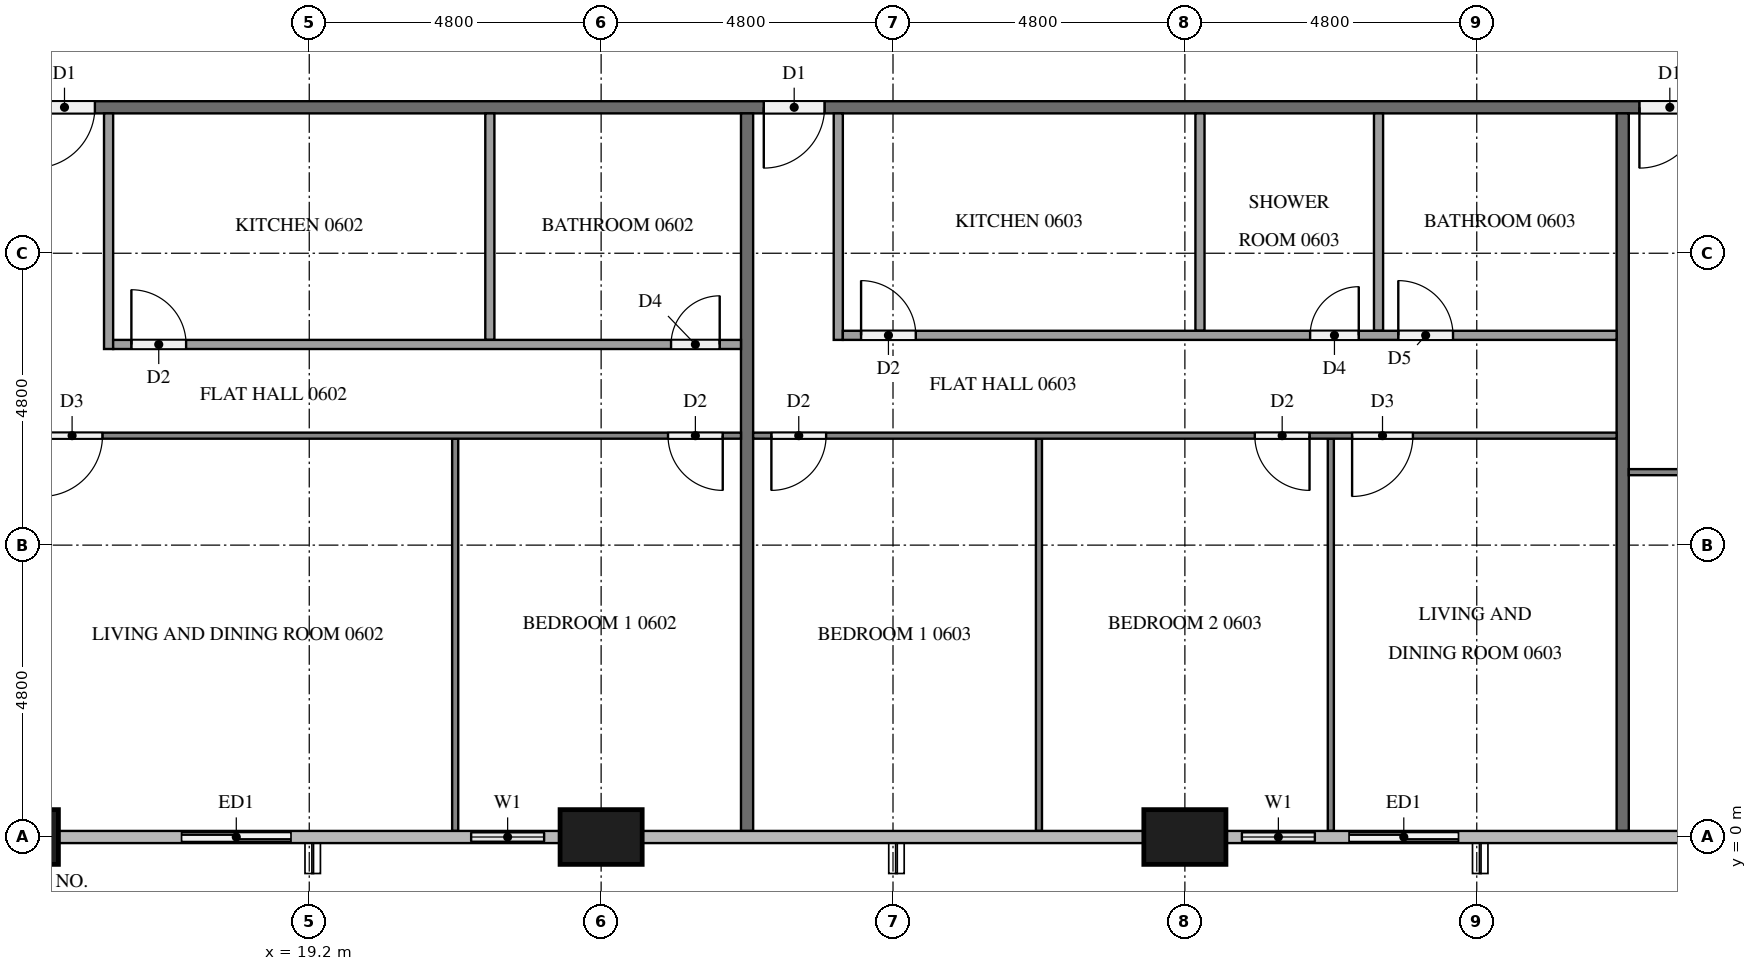
"""IFC4 building model, lengths in metres.
Left out: names, types, materials, properties, quantities, classifications, styles, units other than length and angle.
Written with IfcOpenShell. Run it as: python <this file> out.ifc"""

import sys

from ifc_helpers import new_model, si_unit, direction, frame, frame_2d, origin, origin_2d, place, context, subcontext, project, spatial, rectangle, extrude, element, fill, save


model = new_model("IFC4")
c1 = context("Model", 3, precision=1e-05, world=origin(), true_north=direction((0.0, 1.0)))
c2 = subcontext(c1, "Body", "Model", "MODEL_VIEW")
j1 = project(units=[si_unit("LENGTHUNIT", "METRE"), si_unit("PLANEANGLEUNIT", "RADIAN")], contexts=[c1])
p1 = place(None, origin())
s1 = spatial("IfcSite", under=j1, at=p1, CompositionType="ELEMENT")
p2 = place(p1, origin())
s2 = spatial("IfcBuilding", under=s1, at=p2, CompositionType="ELEMENT")
p3 = place(p2, frame((0.0, 0.0, 29.4)))
s3 = spatial("IfcBuildingStorey", under=s2, at=p3, CompositionType="ELEMENT", Elevation=29.4)
for number, where, z_axis, x_axis in (
    (1, (14.4, 0.0, 0.0), (0.0, 0.0, 1.0), (1.0, 0.0, 0.0)),
    (2, (24.0, 0.0, 0.0), (0.0, 0.0, 1.0), (1.0, 0.0, 0.0)),
    (3, (33.6, 0.0, 0.0), (0.0, 0.0, 1.0), (1.0, 0.0, 0.0)),
):
    element("IfcColumn", number, at=place(p3, frame(where, z_axis=z_axis, x_axis=x_axis)), inside=s3, PredefinedType="COLUMN", context=c2, shape_type="SweptSolid", body=[
        extrude(rectangle(XDim=1.35, YDim=0.9, at=origin_2d()), origin(), (0.0, 0.0, 1.0), 3.2),
    ])
p4 = place(p3, frame((16.8, 0.0, 0.0), z_axis=(0.0, 0.0, 1.0), x_axis=(1.0, 0.0, 0.0)))
e4 = element("IfcWall", 4, at=p4, inside=s3, PredefinedType="SOLIDWALL", context=c2, shape_type="SweptSolid", body=[
    extrude(rectangle(XDim=2.4, YDim=0.15, at=frame_2d((1.2, 0.0))), origin(), (0.0, 0.0, 1.0), 3.2),
])
p5 = place(p4, frame((0.3, 0.0, 0.0)))
e5 = element("IfcOpeningElement", 5, at=p5, cuts=e4, PredefinedType="OPENING", context=c2, shape_type="SweptSolid", body=[
    extrude(rectangle(XDim=1.8, YDim=2.4, at=frame_2d((0.9, 1.2))), frame((0.0, 0.085, 0.0), z_axis=(0.0, -1.0, 0.0), x_axis=(1.0, 0.0, 0.0)), (0.0, 0.0, 1.0), 0.17),
])
p6 = place(p3, frame((21.6, 0.0, 0.0), z_axis=(0.0, 0.0, 1.0), x_axis=(1.0, 0.0, 0.0)))
e6 = element("IfcWall", 6, at=p6, inside=s3, PredefinedType="SOLIDWALL", context=c2, shape_type="SweptSolid", body=[
    extrude(rectangle(XDim=1.725, YDim=0.15, at=frame_2d((0.862, 0.0))), origin(), (0.0, 0.0, 1.0), 3.2),
])
p7 = place(p6, frame((0.262, 0.0, 0.9)))
e7 = element("IfcOpeningElement", 7, at=p7, cuts=e6, PredefinedType="OPENING", context=c2, shape_type="SweptSolid", body=[
    extrude(rectangle(XDim=1.2, YDim=1.4, at=frame_2d((0.6, 0.7))), frame((0.0, 0.085, 0.0), z_axis=(0.0, -1.0, 0.0), x_axis=(1.0, 0.0, 0.0)), (0.0, 0.0, 1.0), 0.17),
])
p8 = place(p3, frame((34.275, 0.0, 0.0), z_axis=(0.0, 0.0, 1.0), x_axis=(1.0, 0.0, 0.0)))
e8 = element("IfcWall", 8, at=p8, inside=s3, PredefinedType="SOLIDWALL", context=c2, shape_type="SweptSolid", body=[
    extrude(rectangle(XDim=4.125, YDim=0.15, at=frame_2d((2.062, 0.0))), origin(), (0.0, 0.0, 1.0), 3.2),
])
p9 = place(p8, frame((0.262, 0.0, 0.9)))
e9 = element("IfcOpeningElement", 9, at=p9, cuts=e8, PredefinedType="OPENING", context=c2, shape_type="SweptSolid", body=[
    extrude(rectangle(XDim=1.2, YDim=1.4, at=frame_2d((0.6, 0.7))), frame((0.0, 0.085, 0.0), z_axis=(0.0, -1.0, 0.0), x_axis=(1.0, 0.0, 0.0)), (0.0, 0.0, 1.0), 0.17),
])
p10 = place(p8, frame((2.025, 0.0, 0.0)))
e10 = element("IfcOpeningElement", 10, at=p10, cuts=e8, PredefinedType="OPENING", context=c2, shape_type="SweptSolid", body=[
    extrude(rectangle(XDim=1.8, YDim=2.4, at=frame_2d((0.9, 1.2))), frame((0.0, 0.085, 0.0), z_axis=(0.0, -1.0, 0.0), x_axis=(1.0, 0.0, 0.0)), (0.0, 0.0, 1.0), 0.17),
])
p11 = place(p3, frame((50.5, 12.0, 0.0), z_axis=(0.0, 0.0, 1.0), x_axis=(-1.0, 0.0, 0.0)))
e11 = element("IfcWall", 11, at=p11, inside=s3, PredefinedType="PARTITIONING", context=c2, shape_type="SweptSolid", body=[
    extrude(rectangle(XDim=38.6, YDim=0.2, at=frame_2d((19.3, 0.0))), origin(), (0.0, 0.0, 1.0), 3.2),
])
p12 = place(p11, frame((36.375, 0.0, 0.0)))
e12 = element("IfcOpeningElement", 12, at=p12, cuts=e11, PredefinedType="OPENING", context=c2, shape_type="SweptSolid", body=[
    extrude(rectangle(XDim=1.0, YDim=2.1, at=frame_2d((0.5, 1.05))), frame((0.0, 0.11, 0.0), z_axis=(0.0, -1.0, 0.0), x_axis=(1.0, 0.0, 0.0)), (0.0, 0.0, 1.0), 0.22),
])
p13 = place(p11, frame((34.825, 0.0, 0.0)))
e13 = element("IfcOpeningElement", 13, at=p13, cuts=e11, PredefinedType="OPENING", context=c2, shape_type="SweptSolid", body=[
    extrude(rectangle(XDim=1.0, YDim=2.1, at=frame_2d((0.5, 1.05))), frame((0.0, 0.11, 0.0), z_axis=(0.0, -1.0, 0.0), x_axis=(1.0, 0.0, 0.0)), (0.0, 0.0, 1.0), 0.22),
])
p14 = place(p11, frame((22.825, 0.0, 0.0)))
e14 = element("IfcOpeningElement", 14, at=p14, cuts=e11, PredefinedType="OPENING", context=c2, shape_type="SweptSolid", body=[
    extrude(rectangle(XDim=1.0, YDim=2.1, at=frame_2d((0.5, 1.05))), frame((0.0, 0.11, 0.0), z_axis=(0.0, -1.0, 0.0), x_axis=(1.0, 0.0, 0.0)), (0.0, 0.0, 1.0), 0.22),
])
p15 = place(p11, frame((8.425, 0.0, 0.0)))
e15 = element("IfcOpeningElement", 15, at=p15, cuts=e11, PredefinedType="OPENING", context=c2, shape_type="SweptSolid", body=[
    extrude(rectangle(XDim=1.0, YDim=2.1, at=frame_2d((0.5, 1.05))), frame((0.0, 0.11, 0.0), z_axis=(0.0, -1.0, 0.0), x_axis=(1.0, 0.0, 0.0)), (0.0, 0.0, 1.0), 0.22),
])
p16 = place(p11, frame((1.225, 0.0, 0.0)))
e16 = element("IfcOpeningElement", 16, at=p16, cuts=e11, PredefinedType="OPENING", context=c2, shape_type="SweptSolid", body=[
    extrude(rectangle(XDim=1.0, YDim=2.1, at=frame_2d((0.5, 1.05))), frame((0.0, 0.11, 0.0), z_axis=(0.0, -1.0, 0.0), x_axis=(1.0, 0.0, 0.0)), (0.0, 0.0, 1.0), 0.22),
])
for number, where, z_axis, x_axis in (
    (17, (26.4, 11.9, 0.0), (0.0, 0.0, 1.0), (0.0, -1.0, 0.0)),
    (18, (40.8, 11.9, 0.0), (0.0, 0.0, 1.0), (0.0, -1.0, 0.0)),
):
    element("IfcWall", number, at=place(p3, frame(where, z_axis=z_axis, x_axis=x_axis)), inside=s3, PredefinedType="PARTITIONING", context=c2, shape_type="SweptSolid", body=[
        extrude(rectangle(XDim=11.8, YDim=0.2, at=frame_2d((5.9, 0.0))), origin(), (0.0, 0.0, 1.0), 3.2),
    ])
p17 = place(p3, frame((21.6, 6.55, 0.0), z_axis=(0.0, 0.0, 1.0), x_axis=(0.0, -1.0, 0.0)))
e19 = element("IfcWall", 19, at=p17, inside=s3, PredefinedType="PARTITIONING", context=c2, shape_type="SweptSolid", body=[
    extrude(rectangle(XDim=6.45, YDim=0.1, at=frame_2d((3.225, 0.0))), origin(), (0.0, 0.0, 1.0), 3.2),
])
p18 = place(p3, frame((26.3, 6.6, 0.0), z_axis=(0.0, 0.0, 1.0), x_axis=(-1.0, 0.0, 0.0)))
e20 = element("IfcWall", 20, at=p18, inside=s3, PredefinedType="PARTITIONING", context=c2, shape_type="SweptSolid", body=[
    extrude(rectangle(XDim=11.8, YDim=0.1, at=frame_2d((5.9, 0.0))), origin(), (0.0, 0.0, 1.0), 3.2),
])
p19 = place(p18, frame((10.5, 0.0, 0.0)))
e21 = element("IfcOpeningElement", 21, at=p19, cuts=e20, PredefinedType="OPENING", context=c2, shape_type="SweptSolid", body=[
    extrude(rectangle(XDim=1.0, YDim=2.1, at=frame_2d((0.5, 1.05))), frame((0.0, 0.06, 0.0), z_axis=(0.0, -1.0, 0.0), x_axis=(1.0, 0.0, 0.0)), (0.0, 0.0, 1.0), 0.12),
])
p20 = place(p18, frame((0.3, 0.0, 0.0)))
e22 = element("IfcOpeningElement", 22, at=p20, cuts=e20, PredefinedType="OPENING", context=c2, shape_type="SweptSolid", body=[
    extrude(rectangle(XDim=0.9, YDim=2.1, at=frame_2d((0.45, 1.05))), frame((0.0, 0.06, 0.0), z_axis=(0.0, -1.0, 0.0), x_axis=(1.0, 0.0, 0.0)), (0.0, 0.0, 1.0), 0.12),
])
p21 = place(p3, frame((22.17, 11.9, 0.0), z_axis=(0.0, 0.0, 1.0), x_axis=(0.0, -1.0, 0.0)))
e23 = element("IfcWall", 23, at=p21, inside=s3, PredefinedType="PARTITIONING", context=c2, shape_type="SweptSolid", body=[
    extrude(rectangle(XDim=3.725, YDim=0.15, at=frame_2d((1.862, 0.0))), origin(), (0.0, 0.0, 1.0), 3.2),
])
p22 = place(p3, frame((15.9, 11.9, 0.0), z_axis=(0.0, 0.0, 1.0), x_axis=(0.0, -1.0, 0.0)))
e24 = element("IfcWall", 24, at=p22, inside=s3, PredefinedType="PARTITIONING", context=c2, shape_type="SweptSolid", body=[
    extrude(rectangle(XDim=3.875, YDim=0.15, at=frame_2d((1.938, 0.0))), origin(), (0.0, 0.0, 1.0), 3.2),
])
p23 = place(p3, frame((15.975, 8.1, 0.0), z_axis=(0.0, 0.0, 1.0), x_axis=(1.0, 0.0, 0.0)))
e25 = element("IfcWall", 25, at=p23, inside=s3, PredefinedType="PARTITIONING", context=c2, shape_type="SweptSolid", body=[
    extrude(rectangle(XDim=10.325, YDim=0.15, at=frame_2d((5.163, 0.0))), origin(), (0.0, 0.0, 1.0), 3.2),
])
p24 = place(p23, frame((0.3, 0.0, 0.0)))
e26 = element("IfcOpeningElement", 26, at=p24, cuts=e25, PredefinedType="OPENING", context=c2, shape_type="SweptSolid", body=[
    extrude(rectangle(XDim=0.9, YDim=2.1, at=frame_2d((0.45, 1.05))), frame((0.0, 0.085, 0.0), z_axis=(0.0, -1.0, 0.0), x_axis=(1.0, 0.0, 0.0)), (0.0, 0.0, 1.0), 0.17),
])
p25 = place(p23, frame((9.175, 0.0, 0.0)))
e27 = element("IfcOpeningElement", 27, at=p25, cuts=e25, PredefinedType="OPENING", context=c2, shape_type="SweptSolid", body=[
    extrude(rectangle(XDim=0.8, YDim=2.1, at=frame_2d((0.4, 1.05))), frame((0.0, 0.085, 0.0), z_axis=(0.0, -1.0, 0.0), x_axis=(1.0, 0.0, 0.0)), (0.0, 0.0, 1.0), 0.17),
])
for number, where, z_axis, x_axis in (
    (28, (31.2, 6.55, 0.0), (0.0, 0.0, 1.0), (0.0, -1.0, 0.0)),
    (29, (36.0, 6.55, 0.0), (0.0, 0.0, 1.0), (0.0, -1.0, 0.0)),
):
    element("IfcWall", number, at=place(p3, frame(where, z_axis=z_axis, x_axis=x_axis)), inside=s3, PredefinedType="PARTITIONING", context=c2, shape_type="SweptSolid", body=[
        extrude(rectangle(XDim=6.45, YDim=0.1, at=frame_2d((3.225, 0.0))), origin(), (0.0, 0.0, 1.0), 3.2),
    ])
p26 = place(p3, frame((40.7, 6.6, 0.0), z_axis=(0.0, 0.0, 1.0), x_axis=(-1.0, 0.0, 0.0)))
e30 = element("IfcWall", 30, at=p26, inside=s3, PredefinedType="PARTITIONING", context=c2, shape_type="SweptSolid", body=[
    extrude(rectangle(XDim=14.2, YDim=0.1, at=frame_2d((7.1, 0.0))), origin(), (0.0, 0.0, 1.0), 3.2),
])
p27 = place(p26, frame((13.0, 0.0, 0.0)))
e31 = element("IfcOpeningElement", 31, at=p27, cuts=e30, PredefinedType="OPENING", context=c2, shape_type="SweptSolid", body=[
    extrude(rectangle(XDim=0.9, YDim=2.1, at=frame_2d((0.45, 1.05))), frame((0.0, 0.06, 0.0), z_axis=(0.0, -1.0, 0.0), x_axis=(1.0, 0.0, 0.0)), (0.0, 0.0, 1.0), 0.12),
])
p28 = place(p26, frame((5.05, 0.0, 0.0)))
e32 = element("IfcOpeningElement", 32, at=p28, cuts=e30, PredefinedType="OPENING", context=c2, shape_type="SweptSolid", body=[
    extrude(rectangle(XDim=0.9, YDim=2.1, at=frame_2d((0.45, 1.05))), frame((0.0, 0.06, 0.0), z_axis=(0.0, -1.0, 0.0), x_axis=(1.0, 0.0, 0.0)), (0.0, 0.0, 1.0), 0.12),
])
p29 = place(p26, frame((3.35, 0.0, 0.0)))
e33 = element("IfcOpeningElement", 33, at=p29, cuts=e30, PredefinedType="OPENING", context=c2, shape_type="SweptSolid", body=[
    extrude(rectangle(XDim=1.0, YDim=2.1, at=frame_2d((0.5, 1.05))), frame((0.0, 0.06, 0.0), z_axis=(0.0, -1.0, 0.0), x_axis=(1.0, 0.0, 0.0)), (0.0, 0.0, 1.0), 0.12),
])
for number, where, z_axis, x_axis in (
    (34, (33.848, 11.9, 0.0), (0.0, 0.0, 1.0), (0.0, -1.0, 0.0)),
    (35, (36.785, 11.9, 0.0), (0.0, 0.0, 1.0), (0.0, -1.0, 0.0)),
):
    element("IfcWall", number, at=place(p3, frame(where, z_axis=z_axis, x_axis=x_axis)), inside=s3, PredefinedType="PARTITIONING", context=c2, shape_type="SweptSolid", body=[
        extrude(rectangle(XDim=3.575, YDim=0.15, at=frame_2d((1.788, 0.0))), origin(), (0.0, 0.0, 1.0), 3.2),
    ])
p30 = place(p3, frame((27.9, 11.9, 0.0), z_axis=(0.0, 0.0, 1.0), x_axis=(0.0, -1.0, 0.0)))
e36 = element("IfcWall", 36, at=p30, inside=s3, PredefinedType="PARTITIONING", context=c2, shape_type="SweptSolid", body=[
    extrude(rectangle(XDim=3.725, YDim=0.15, at=frame_2d((1.862, 0.0))), origin(), (0.0, 0.0, 1.0), 3.2),
])
p31 = place(p3, frame((27.975, 8.25, 0.0), z_axis=(0.0, 0.0, 1.0), x_axis=(1.0, 0.0, 0.0)))
e37 = element("IfcWall", 37, at=p31, inside=s3, PredefinedType="PARTITIONING", context=c2, shape_type="SweptSolid", body=[
    extrude(rectangle(XDim=12.725, YDim=0.15, at=frame_2d((6.362, 0.0))), origin(), (0.0, 0.0, 1.0), 3.2),
])
p32 = place(p31, frame((0.3, 0.0, 0.0)))
e38 = element("IfcOpeningElement", 38, at=p32, cuts=e37, PredefinedType="OPENING", context=c2, shape_type="SweptSolid", body=[
    extrude(rectangle(XDim=0.9, YDim=2.1, at=frame_2d((0.45, 1.05))), frame((0.0, 0.085, 0.0), z_axis=(0.0, -1.0, 0.0), x_axis=(1.0, 0.0, 0.0)), (0.0, 0.0, 1.0), 0.17),
])
p33 = place(p31, frame((7.685, 0.0, 0.0)))
e39 = element("IfcOpeningElement", 39, at=p33, cuts=e37, PredefinedType="OPENING", context=c2, shape_type="SweptSolid", body=[
    extrude(rectangle(XDim=0.8, YDim=2.1, at=frame_2d((0.4, 1.05))), frame((0.0, 0.085, 0.0), z_axis=(0.0, -1.0, 0.0), x_axis=(1.0, 0.0, 0.0)), (0.0, 0.0, 1.0), 0.17),
])
p34 = place(p31, frame((9.135, 0.0, 0.0)))
e40 = element("IfcOpeningElement", 40, at=p34, cuts=e37, PredefinedType="OPENING", context=c2, shape_type="SweptSolid", body=[
    extrude(rectangle(XDim=0.9, YDim=2.1, at=frame_2d((0.45, 1.05))), frame((0.0, 0.085, 0.0), z_axis=(0.0, -1.0, 0.0), x_axis=(1.0, 0.0, 0.0)), (0.0, 0.0, 1.0), 0.17),
])
p35 = place(p3, frame((47.9, 6.0, 0.0), z_axis=(0.0, 0.0, 1.0), x_axis=(-1.0, 0.0, 0.0)))
e41 = element("IfcWall", 41, at=p35, inside=s3, PredefinedType="PARTITIONING", context=c2, shape_type="SweptSolid", body=[
    extrude(rectangle(XDim=7.0, YDim=0.1, at=frame_2d((3.5, 0.0))), origin(), (0.0, 0.0, 1.0), 3.2),
])
p36 = place(p35, frame((0.3, 0.0, 0.0)))
e42 = element("IfcOpeningElement", 42, at=p36, cuts=e41, PredefinedType="OPENING", context=c2, shape_type="SweptSolid", body=[
    extrude(rectangle(XDim=1.0, YDim=2.1, at=frame_2d((0.5, 1.05))), frame((0.0, 0.06, 0.0), z_axis=(0.0, -1.0, 0.0), x_axis=(1.0, 0.0, 0.0)), (0.0, 0.0, 1.0), 0.12),
])
p37 = place(p5, origin())
e43 = element("IfcDoor", 43, at=p37, inside=s3, OperationType="SLIDING_TO_LEFT", PredefinedType="DOOR", context=c2, shape_type="SweptSolid", body=[
    extrude(rectangle(XDim=1.8, YDim=2.4, at=frame_2d((0.9, 1.2))), frame((0.0, 0.025, 0.0), z_axis=(0.0, -1.0, 0.0), x_axis=(1.0, 0.0, 0.0)), (0.0, 0.0, 1.0), 0.05),
])
fill(e5, e43)
p38 = place(p7, origin())
e44 = element("IfcWindow", 44, at=p38, inside=s3, PartitioningType="SINGLE_PANEL", PredefinedType="WINDOW", context=c2, shape_type="SweptSolid", body=[
    extrude(rectangle(XDim=1.2, YDim=1.4, at=frame_2d((0.6, 0.7))), frame((0.0, 0.03, 0.0), z_axis=(0.0, -1.0, 0.0), x_axis=(1.0, 0.0, 0.0)), (0.0, 0.0, 1.0), 0.06),
])
fill(e7, e44)
p39 = place(p9, origin())
e45 = element("IfcWindow", 45, at=p39, inside=s3, PartitioningType="SINGLE_PANEL", PredefinedType="WINDOW", context=c2, shape_type="SweptSolid", body=[
    extrude(rectangle(XDim=1.2, YDim=1.4, at=frame_2d((0.6, 0.7))), frame((0.0, 0.03, 0.0), z_axis=(0.0, -1.0, 0.0), x_axis=(1.0, 0.0, 0.0)), (0.0, 0.0, 1.0), 0.06),
])
fill(e9, e45)
p40 = place(p10, origin())
e46 = element("IfcDoor", 46, at=p40, inside=s3, OperationType="SLIDING_TO_RIGHT", PredefinedType="DOOR", context=c2, shape_type="SweptSolid", body=[
    extrude(rectangle(XDim=1.8, YDim=2.4, at=frame_2d((0.9, 1.2))), frame((0.0, 0.025, 0.0), z_axis=(0.0, -1.0, 0.0), x_axis=(1.0, 0.0, 0.0)), (0.0, 0.0, 1.0), 0.05),
])
fill(e10, e46)
p41 = place(p13, origin())
e47 = element("IfcDoor", 47, at=p41, inside=s3, OperationType="SINGLE_SWING_RIGHT", PredefinedType="DOOR", context=c2, shape_type="SweptSolid", body=[
    extrude(rectangle(XDim=1.0, YDim=2.1, at=frame_2d((0.5, 1.05))), frame((0.0, 0.025, 0.0), z_axis=(0.0, -1.0, 0.0), x_axis=(1.0, 0.0, 0.0)), (0.0, 0.0, 1.0), 0.05),
])
fill(e13, e47)
p42 = place(p14, origin())
e48 = element("IfcDoor", 48, at=p42, inside=s3, OperationType="SINGLE_SWING_RIGHT", PredefinedType="DOOR", context=c2, shape_type="SweptSolid", body=[
    extrude(rectangle(XDim=1.0, YDim=2.1, at=frame_2d((0.5, 1.05))), frame((0.0, 0.025, 0.0), z_axis=(0.0, -1.0, 0.0), x_axis=(1.0, 0.0, 0.0)), (0.0, 0.0, 1.0), 0.05),
])
fill(e14, e48)
p43 = place(p15, origin())
e49 = element("IfcDoor", 49, at=p43, inside=s3, OperationType="SINGLE_SWING_RIGHT", PredefinedType="DOOR", context=c2, shape_type="SweptSolid", body=[
    extrude(rectangle(XDim=1.0, YDim=2.1, at=frame_2d((0.5, 1.05))), frame((0.0, 0.025, 0.0), z_axis=(0.0, -1.0, 0.0), x_axis=(1.0, 0.0, 0.0)), (0.0, 0.0, 1.0), 0.05),
])
fill(e15, e49)
p44 = place(p19, origin())
e50 = element("IfcDoor", 50, at=p44, inside=s3, OperationType="SINGLE_SWING_RIGHT", PredefinedType="DOOR", context=c2, shape_type="SweptSolid", body=[
    extrude(rectangle(XDim=1.0, YDim=2.1, at=frame_2d((0.5, 1.05))), frame((0.0, 0.025, 0.0), z_axis=(0.0, -1.0, 0.0), x_axis=(1.0, 0.0, 0.0)), (0.0, 0.0, 1.0), 0.05),
])
fill(e21, e50)
p45 = place(p20, origin())
e51 = element("IfcDoor", 51, at=p45, inside=s3, OperationType="SINGLE_SWING_LEFT", PredefinedType="DOOR", context=c2, shape_type="SweptSolid", body=[
    extrude(rectangle(XDim=0.9, YDim=2.1, at=frame_2d((0.45, 1.05))), frame((0.0, 0.025, 0.0), z_axis=(0.0, -1.0, 0.0), x_axis=(1.0, 0.0, 0.0)), (0.0, 0.0, 1.0), 0.05),
])
fill(e22, e51)
p46 = place(p24, origin())
e52 = element("IfcDoor", 52, at=p46, inside=s3, OperationType="SINGLE_SWING_LEFT", PredefinedType="DOOR", context=c2, shape_type="SweptSolid", body=[
    extrude(rectangle(XDim=0.9, YDim=2.1, at=frame_2d((0.45, 1.05))), frame((0.0, 0.025, 0.0), z_axis=(0.0, -1.0, 0.0), x_axis=(1.0, 0.0, 0.0)), (0.0, 0.0, 1.0), 0.05),
])
fill(e26, e52)
p47 = place(p25, origin())
e53 = element("IfcDoor", 53, at=p47, inside=s3, OperationType="SINGLE_SWING_RIGHT", PredefinedType="DOOR", context=c2, shape_type="SweptSolid", body=[
    extrude(rectangle(XDim=0.8, YDim=2.1, at=frame_2d((0.4, 1.05))), frame((0.0, 0.025, 0.0), z_axis=(0.0, -1.0, 0.0), x_axis=(1.0, 0.0, 0.0)), (0.0, 0.0, 1.0), 0.05),
])
fill(e27, e53)
p48 = place(p27, origin())
e54 = element("IfcDoor", 54, at=p48, inside=s3, OperationType="SINGLE_SWING_RIGHT", PredefinedType="DOOR", context=c2, shape_type="SweptSolid", body=[
    extrude(rectangle(XDim=0.9, YDim=2.1, at=frame_2d((0.45, 1.05))), frame((0.0, 0.025, 0.0), z_axis=(0.0, -1.0, 0.0), x_axis=(1.0, 0.0, 0.0)), (0.0, 0.0, 1.0), 0.05),
])
fill(e31, e54)
p49 = place(p28, origin())
e55 = element("IfcDoor", 55, at=p49, inside=s3, OperationType="SINGLE_SWING_LEFT", PredefinedType="DOOR", context=c2, shape_type="SweptSolid", body=[
    extrude(rectangle(XDim=0.9, YDim=2.1, at=frame_2d((0.45, 1.05))), frame((0.0, 0.025, 0.0), z_axis=(0.0, -1.0, 0.0), x_axis=(1.0, 0.0, 0.0)), (0.0, 0.0, 1.0), 0.05),
])
fill(e32, e55)
p50 = place(p29, origin())
e56 = element("IfcDoor", 56, at=p50, inside=s3, OperationType="SINGLE_SWING_RIGHT", PredefinedType="DOOR", context=c2, shape_type="SweptSolid", body=[
    extrude(rectangle(XDim=1.0, YDim=2.1, at=frame_2d((0.5, 1.05))), frame((0.0, 0.025, 0.0), z_axis=(0.0, -1.0, 0.0), x_axis=(1.0, 0.0, 0.0)), (0.0, 0.0, 1.0), 0.05),
])
fill(e33, e56)
p51 = place(p32, origin())
e57 = element("IfcDoor", 57, at=p51, inside=s3, OperationType="SINGLE_SWING_LEFT", PredefinedType="DOOR", context=c2, shape_type="SweptSolid", body=[
    extrude(rectangle(XDim=0.9, YDim=2.1, at=frame_2d((0.45, 1.05))), frame((0.0, 0.025, 0.0), z_axis=(0.0, -1.0, 0.0), x_axis=(1.0, 0.0, 0.0)), (0.0, 0.0, 1.0), 0.05),
])
fill(e38, e57)
p52 = place(p33, origin())
e58 = element("IfcDoor", 58, at=p52, inside=s3, OperationType="SINGLE_SWING_RIGHT", PredefinedType="DOOR", context=c2, shape_type="SweptSolid", body=[
    extrude(rectangle(XDim=0.8, YDim=2.1, at=frame_2d((0.4, 1.05))), frame((0.0, 0.025, 0.0), z_axis=(0.0, -1.0, 0.0), x_axis=(1.0, 0.0, 0.0)), (0.0, 0.0, 1.0), 0.05),
])
fill(e39, e58)
p53 = place(p34, origin())
e59 = element("IfcDoor", 59, at=p53, inside=s3, OperationType="SINGLE_SWING_LEFT", PredefinedType="DOOR", context=c2, shape_type="SweptSolid", body=[
    extrude(rectangle(XDim=0.9, YDim=2.1, at=frame_2d((0.45, 1.05))), frame((0.0, 0.025, 0.0), z_axis=(0.0, -1.0, 0.0), x_axis=(1.0, 0.0, 0.0)), (0.0, 0.0, 1.0), 0.05),
])
fill(e40, e59)
save(model, sys.argv[1])
